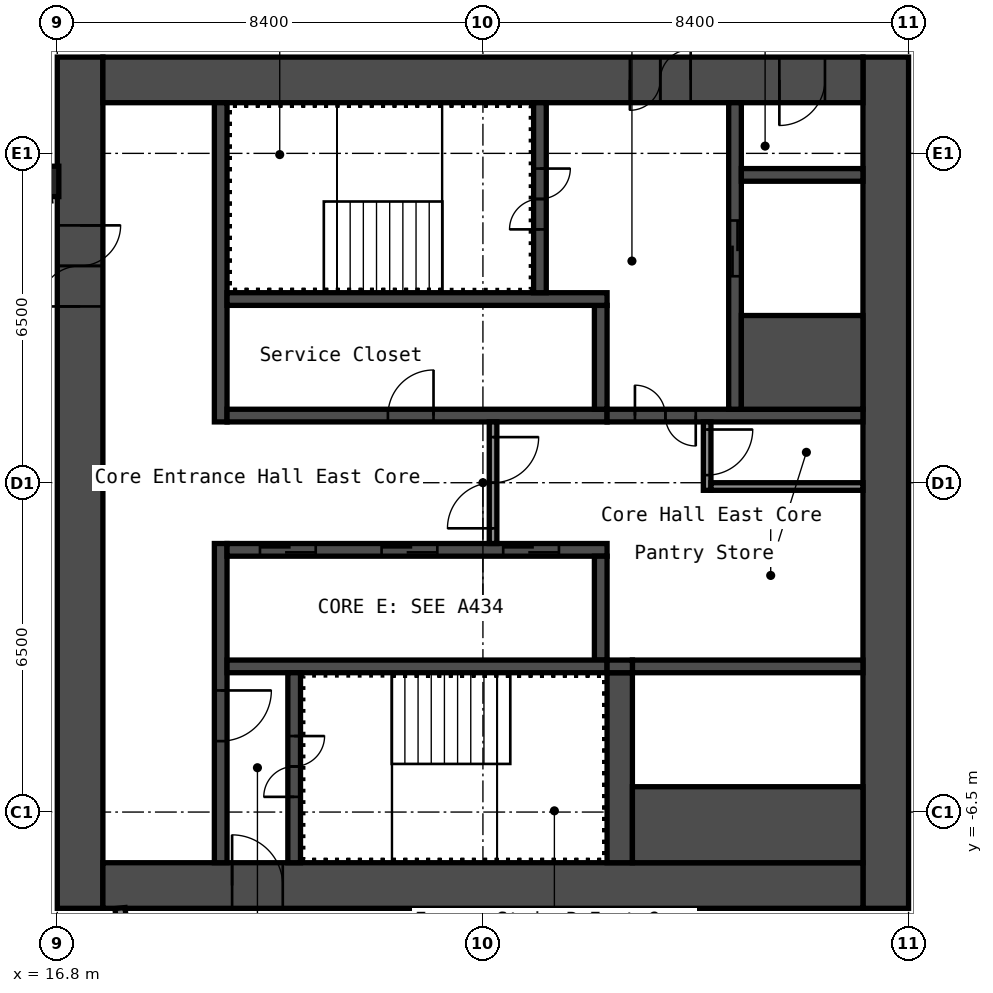
"""IFC4 building model, lengths in metres.
Left out: names, types, materials, properties, quantities, classifications, styles, units other than length and angle.
Written with IfcOpenShell. Run it as: python <this file> out.ifc"""

import sys

from ifc_helpers import new_model, si_unit, direction, frame, frame_2d, origin, origin_2d, place, context, subcontext, project, spatial, rectangle, hollow_rectangle, extrude, element, fill, save


model = new_model("IFC4")
c1 = context("Model", 3, precision=1e-05, world=origin(), true_north=direction((0.0, 1.0)))
c2 = subcontext(c1, "Body", "Model", "MODEL_VIEW")
j1 = project(units=[si_unit("LENGTHUNIT", "METRE"), si_unit("PLANEANGLEUNIT", "RADIAN")], contexts=[c1])
p1 = place(None, origin())
s1 = spatial("IfcSite", under=j1, at=p1, CompositionType="ELEMENT")
p2 = place(p1, origin())
s2 = spatial("IfcBuilding", under=s1, at=p2, CompositionType="ELEMENT")
p3 = place(p2, frame((0.0, 0.0, 232.6)))
s3 = spatial("IfcBuildingStorey", under=s2, at=p3, CompositionType="ELEMENT", Elevation=232.6)
p4 = place(p3, frame((16.53, 5.947, 0.0), z_axis=(0.0, 0.0, 1.0), x_axis=(1.0, 0.0, 0.0)))
e1 = element("IfcColumn", 1, at=p4, inside=s3, PredefinedType="COLUMN", context=c2, shape_type="SweptSolid", body=[
    extrude(hollow_rectangle(XDim=0.6, YDim=0.6, WallThickness=0.025, InnerFilletRadius=0.038, OuterFilletRadius=0.062, at=origin_2d()), origin(), (0.0, 0.0, 1.0), 5.95),
])
p5 = place(p3, frame((17.25, -8.4, 0.0), z_axis=(0.0, 0.0, 1.0), x_axis=(0.0, 1.0, 0.0)))
e2 = element("IfcWall", 2, at=p5, inside=s3, PredefinedType="SHEAR", context=c2, shape_type="SweptSolid", body=[
    extrude(rectangle(XDim=16.8, YDim=0.9, at=frame_2d((8.4, 0.0))), origin(), (0.0, 0.0, 1.0), 5.95),
])
p6 = place(p5, frame((11.879, 0.0, 0.0)))
e3 = element("IfcOpeningElement", 3, at=p6, cuts=e2, PredefinedType="OPENING", context=c2, shape_type="SweptSolid", body=[
    extrude(rectangle(XDim=1.6, YDim=2.1, at=frame_2d((0.8, 1.05))), frame((0.0, 0.46, 0.0), z_axis=(0.0, -1.0, 0.0), x_axis=(1.0, 0.0, 0.0)), (0.0, 0.0, 1.0), 0.92),
])
p7 = place(p3, frame((33.15, -8.4, 0.0), z_axis=(0.0, 0.0, 1.0), x_axis=(0.0, 1.0, 0.0)))
e4 = element("IfcWall", 4, at=p7, inside=s3, PredefinedType="SHEAR", context=c2, shape_type="SweptSolid", body=[
    extrude(rectangle(XDim=16.8, YDim=0.9, at=frame_2d((8.4, 0.0))), origin(), (0.0, 0.0, 1.0), 5.95),
])
p8 = place(p3, frame((17.7, 7.95, 0.0), z_axis=(0.0, 0.0, 1.0), x_axis=(1.0, 0.0, 0.0)))
e5 = element("IfcWall", 5, at=p8, inside=s3, PredefinedType="SHEAR", context=c2, shape_type="SweptSolid", body=[
    extrude(rectangle(XDim=15.0, YDim=0.9, at=frame_2d((7.5, 0.0))), origin(), (0.0, 0.0, 1.0), 5.95),
])
p9 = place(p8, frame((10.4, 0.0, 0.0)))
e6 = element("IfcOpeningElement", 6, at=p9, cuts=e5, PredefinedType="OPENING", context=c2, shape_type="SweptSolid", body=[
    extrude(rectangle(XDim=1.2, YDim=2.1, at=frame_2d((0.6, 1.05))), frame((0.0, 0.46, 0.0), z_axis=(0.0, -1.0, 0.0), x_axis=(1.0, 0.0, 0.0)), (0.0, 0.0, 1.0), 0.92),
])
p10 = place(p8, frame((13.35, 0.0, 0.0)))
e7 = element("IfcOpeningElement", 7, at=p10, cuts=e5, PredefinedType="OPENING", context=c2, shape_type="SweptSolid", body=[
    extrude(rectangle(XDim=0.9, YDim=2.1, at=frame_2d((0.45, 1.05))), frame((0.0, 0.46, 0.0), z_axis=(0.0, -1.0, 0.0), x_axis=(1.0, 0.0, 0.0)), (0.0, 0.0, 1.0), 0.92),
])
p11 = place(p3, frame((17.7, -7.95, 0.0), z_axis=(0.0, 0.0, 1.0), x_axis=(1.0, 0.0, 0.0)))
e8 = element("IfcWall", 8, at=p11, inside=s3, PredefinedType="SHEAR", context=c2, shape_type="SweptSolid", body=[
    extrude(rectangle(XDim=15.0, YDim=0.9, at=frame_2d((7.5, 0.0))), origin(), (0.0, 0.0, 1.0), 5.95),
])
p12 = place(p11, frame((2.55, 0.0, 0.0)))
e9 = element("IfcOpeningElement", 9, at=p12, cuts=e8, PredefinedType="OPENING", context=c2, shape_type="SweptSolid", body=[
    extrude(rectangle(XDim=1.0, YDim=2.1, at=frame_2d((0.5, 1.05))), frame((0.0, 0.46, 0.0), z_axis=(0.0, -1.0, 0.0), x_axis=(1.0, 0.0, 0.0)), (0.0, 0.0, 1.0), 0.92),
])
p13 = place(p3, frame((20.025, 1.2, 0.0), z_axis=(0.0, 0.0, 1.0), x_axis=(0.0, 1.0, 0.0)))
e10 = element("IfcWall", 10, at=p13, inside=s3, PredefinedType="SHEAR", context=c2, shape_type="SweptSolid", body=[
    extrude(rectangle(XDim=6.3, YDim=0.25, at=frame_2d((3.15, 0.0))), origin(), (0.0, 0.0, 1.0), 5.95),
])
p14 = place(p3, frame((20.025, -7.5, 0.0), z_axis=(0.0, 0.0, 1.0), x_axis=(0.0, 1.0, 0.0)))
e11 = element("IfcWall", 11, at=p14, inside=s3, PredefinedType="SHEAR", context=c2, shape_type="SweptSolid", body=[
    extrude(rectangle(XDim=6.3, YDim=0.25, at=frame_2d((3.15, 0.0))), origin(), (0.0, 0.0, 1.0), 5.95),
])
p15 = place(p14, frame((2.4, 0.0, 0.0)))
e12 = element("IfcOpeningElement", 12, at=p15, cuts=e11, PredefinedType="OPENING", context=c2, shape_type="SweptSolid", body=[
    extrude(rectangle(XDim=1.0, YDim=2.1, at=frame_2d((0.5, 1.05))), frame((0.0, 0.135, 0.0), z_axis=(0.0, -1.0, 0.0), x_axis=(1.0, 0.0, 0.0)), (0.0, 0.0, 1.0), 0.27),
])
p16 = place(p3, frame((20.15, 1.325, 0.0), z_axis=(0.0, 0.0, 1.0), x_axis=(1.0, 0.0, 0.0)))
e13 = element("IfcWall", 13, at=p16, inside=s3, PredefinedType="SHEAR", context=c2, shape_type="SweptSolid", body=[
    extrude(rectangle(XDim=7.5, YDim=0.25, at=frame_2d((3.75, 0.0))), origin(), (0.0, 0.0, 1.0), 5.95),
])
p17 = place(p16, frame((3.175, 0.0, 0.0)))
e14 = element("IfcOpeningElement", 14, at=p17, cuts=e13, PredefinedType="OPENING", context=c2, shape_type="SweptSolid", body=[
    extrude(rectangle(XDim=0.9, YDim=2.1, at=frame_2d((0.45, 1.05))), frame((0.0, 0.135, 0.0), z_axis=(0.0, -1.0, 0.0), x_axis=(1.0, 0.0, 0.0)), (0.0, 0.0, 1.0), 0.27),
])
p18 = place(p3, frame((27.525, 1.45, 0.0), z_axis=(0.0, 0.0, 1.0), x_axis=(0.0, 1.0, 0.0)))
e15 = element("IfcWall", 15, at=p18, inside=s3, PredefinedType="SHEAR", context=c2, shape_type="SweptSolid", body=[
    extrude(rectangle(XDim=2.05, YDim=0.25, at=frame_2d((1.025, 0.0))), origin(), (0.0, 0.0, 1.0), 5.95),
])
p19 = place(p3, frame((20.15, 3.625, 0.0), z_axis=(0.0, 0.0, 1.0), x_axis=(1.0, 0.0, 0.0)))
e16 = element("IfcWall", 16, at=p19, inside=s3, PredefinedType="SHEAR", context=c2, shape_type="SweptSolid", body=[
    extrude(rectangle(XDim=7.5, YDim=0.25, at=frame_2d((3.75, 0.0))), origin(), (0.0, 0.0, 1.0), 5.95),
])
p20 = place(p3, frame((26.325, 3.75, 0.0), z_axis=(0.0, 0.0, 1.0), x_axis=(0.0, 1.0, 0.0)))
e17 = element("IfcWall", 17, at=p20, inside=s3, PredefinedType="SHEAR", context=c2, shape_type="SweptSolid", body=[
    extrude(rectangle(XDim=3.75, YDim=0.25, at=frame_2d((1.875, 0.0))), origin(), (0.0, 0.0, 1.0), 5.95),
])
p21 = place(p20, frame((1.25, 0.0, 0.0)))
e18 = element("IfcOpeningElement", 18, at=p21, cuts=e17, PredefinedType="OPENING", context=c2, shape_type="SweptSolid", body=[
    extrude(rectangle(XDim=1.2, YDim=2.1, at=frame_2d((0.6, 1.05))), frame((0.0, 0.135, 0.0), z_axis=(0.0, -1.0, 0.0), x_axis=(1.0, 0.0, 0.0)), (0.0, 0.0, 1.0), 0.27),
])
p22 = place(p3, frame((27.65, 1.325, 0.0), z_axis=(0.0, 0.0, 1.0), x_axis=(1.0, 0.0, 0.0)))
e19 = element("IfcWall", 19, at=p22, inside=s3, PredefinedType="SHEAR", context=c2, shape_type="SweptSolid", body=[
    extrude(rectangle(XDim=5.05, YDim=0.25, at=frame_2d((2.525, 0.0))), origin(), (0.0, 0.0, 1.0), 5.95),
])
p23 = place(p22, frame((0.55, 0.0, 0.0)))
e20 = element("IfcOpeningElement", 20, at=p23, cuts=e19, PredefinedType="OPENING", context=c2, shape_type="SweptSolid", body=[
    extrude(rectangle(XDim=1.2, YDim=2.1, at=frame_2d((0.6, 1.05))), frame((0.0, 0.135, 0.0), z_axis=(0.0, -1.0, 0.0), x_axis=(1.0, 0.0, 0.0)), (0.0, 0.0, 1.0), 0.27),
])
p24 = place(p3, frame((30.175, 1.45, 0.0), z_axis=(0.0, 0.0, 1.0), x_axis=(0.0, 1.0, 0.0)))
e21 = element("IfcWall", 21, at=p24, inside=s3, PredefinedType="SHEAR", context=c2, shape_type="SweptSolid", body=[
    extrude(rectangle(XDim=6.05, YDim=0.25, at=frame_2d((3.025, 0.0))), origin(), (0.0, 0.0, 1.0), 5.95),
])
p25 = place(p24, frame((2.625, 0.0, 0.0)))
e22 = element("IfcOpeningElement", 22, at=p25, cuts=e21, PredefinedType="OPENING", context=c2, shape_type="SweptSolid", body=[
    extrude(rectangle(XDim=1.1, YDim=2.1, at=frame_2d((0.55, 1.05))), frame((0.0, 0.135, 0.0), z_axis=(0.0, -1.0, 0.0), x_axis=(1.0, 0.0, 0.0)), (0.0, 0.0, 1.0), 0.27),
])
p26 = place(p3, frame((30.3, 2.375, 0.0), z_axis=(0.0, 0.0, 1.0), x_axis=(1.0, 0.0, 0.0)))
e23 = element("IfcWall", 23, at=p26, inside=s3, PredefinedType="SHEAR", context=c2, shape_type="SweptSolid", body=[
    extrude(rectangle(XDim=2.4, YDim=1.85, at=frame_2d((1.2, 0.0))), origin(), (0.0, 0.0, 1.0), 5.95),
])
p27 = place(p3, frame((30.3, 6.075, 0.0), z_axis=(0.0, 0.0, 1.0), x_axis=(1.0, 0.0, 0.0)))
e24 = element("IfcWall", 24, at=p27, inside=s3, PredefinedType="SHEAR", context=c2, shape_type="SweptSolid", body=[
    extrude(rectangle(XDim=2.4, YDim=0.25, at=frame_2d((1.2, 0.0))), origin(), (0.0, 0.0, 1.0), 5.95),
])
p28 = place(p3, frame((20.15, -1.325, 0.0), z_axis=(0.0, 0.0, 1.0), x_axis=(1.0, 0.0, 0.0)))
e25 = element("IfcWall", 25, at=p28, inside=s3, PredefinedType="SHEAR", context=c2, shape_type="SweptSolid", body=[
    extrude(rectangle(XDim=7.5, YDim=0.25, at=frame_2d((3.75, 0.0))), origin(), (0.0, 0.0, 1.0), 5.95),
])
p29 = place(p28, frame((0.65, 0.0, 0.0)))
e26 = element("IfcOpeningElement", 26, at=p29, cuts=e25, PredefinedType="OPENING", context=c2, shape_type="SweptSolid", body=[
    extrude(rectangle(XDim=1.1, YDim=2.1, at=frame_2d((0.55, 1.05))), frame((0.0, 0.135, 0.0), z_axis=(0.0, -1.0, 0.0), x_axis=(1.0, 0.0, 0.0)), (0.0, 0.0, 1.0), 0.27),
])
p30 = place(p28, frame((3.05, 0.0, 0.0)))
e27 = element("IfcOpeningElement", 27, at=p30, cuts=e25, PredefinedType="OPENING", context=c2, shape_type="SweptSolid", body=[
    extrude(rectangle(XDim=1.1, YDim=2.1, at=frame_2d((0.55, 1.05))), frame((0.0, 0.135, 0.0), z_axis=(0.0, -1.0, 0.0), x_axis=(1.0, 0.0, 0.0)), (0.0, 0.0, 1.0), 0.27),
])
p31 = place(p28, frame((5.45, 0.0, 0.0)))
e28 = element("IfcOpeningElement", 28, at=p31, cuts=e25, PredefinedType="OPENING", context=c2, shape_type="SweptSolid", body=[
    extrude(rectangle(XDim=1.1, YDim=2.1, at=frame_2d((0.55, 1.05))), frame((0.0, 0.135, 0.0), z_axis=(0.0, -1.0, 0.0), x_axis=(1.0, 0.0, 0.0)), (0.0, 0.0, 1.0), 0.27),
])
p32 = place(p3, frame((27.525, -3.5, 0.0), z_axis=(0.0, 0.0, 1.0), x_axis=(0.0, 1.0, 0.0)))
e29 = element("IfcWall", 29, at=p32, inside=s3, PredefinedType="SHEAR", context=c2, shape_type="SweptSolid", body=[
    extrude(rectangle(XDim=2.05, YDim=0.25, at=frame_2d((1.025, 0.0))), origin(), (0.0, 0.0, 1.0), 5.95),
])
p33 = place(p3, frame((20.15, -3.625, 0.0), z_axis=(0.0, 0.0, 1.0), x_axis=(1.0, 0.0, 0.0)))
e30 = element("IfcWall", 30, at=p33, inside=s3, PredefinedType="SHEAR", context=c2, shape_type="SweptSolid", body=[
    extrude(rectangle(XDim=7.5, YDim=0.25, at=frame_2d((3.75, 0.0))), origin(), (0.0, 0.0, 1.0), 5.95),
])
p34 = place(p3, frame((21.475, -7.5, 0.0), z_axis=(0.0, 0.0, 1.0), x_axis=(0.0, 1.0, 0.0)))
e31 = element("IfcWall", 31, at=p34, inside=s3, PredefinedType="SHEAR", context=c2, shape_type="SweptSolid", body=[
    extrude(rectangle(XDim=3.75, YDim=0.25, at=frame_2d((1.875, 0.0))), origin(), (0.0, 0.0, 1.0), 5.95),
])
p35 = place(p34, frame((1.3, 0.0, 0.0)))
e32 = element("IfcOpeningElement", 32, at=p35, cuts=e31, PredefinedType="OPENING", context=c2, shape_type="SweptSolid", body=[
    extrude(rectangle(XDim=1.2, YDim=2.1, at=frame_2d((0.6, 1.05))), frame((0.0, 0.135, 0.0), z_axis=(0.0, -1.0, 0.0), x_axis=(1.0, 0.0, 0.0)), (0.0, 0.0, 1.0), 0.27),
])
p36 = place(p3, frame((27.9, -7.5, 0.0), z_axis=(0.0, 0.0, 1.0), x_axis=(0.0, 1.0, 0.0)))
e33 = element("IfcWall", 33, at=p36, inside=s3, PredefinedType="SHEAR", context=c2, shape_type="SweptSolid", body=[
    extrude(rectangle(XDim=3.75, YDim=0.5, at=frame_2d((1.875, 0.0))), origin(), (0.0, 0.0, 1.0), 5.95),
])
p37 = place(p3, frame((28.15, -3.625, 0.0), z_axis=(0.0, 0.0, 1.0), x_axis=(1.0, 0.0, 0.0)))
e34 = element("IfcWall", 34, at=p37, inside=s3, PredefinedType="SHEAR", context=c2, shape_type="SweptSolid", body=[
    extrude(rectangle(XDim=4.55, YDim=0.25, at=frame_2d((2.275, 0.0))), origin(), (0.0, 0.0, 1.0), 5.95),
])
p38 = place(p3, frame((28.15, -6.75, 0.0), z_axis=(0.0, 0.0, 1.0), x_axis=(1.0, 0.0, 0.0)))
e35 = element("IfcWall", 35, at=p38, inside=s3, PredefinedType="SHEAR", context=c2, shape_type="SweptSolid", body=[
    extrude(rectangle(XDim=4.55, YDim=1.5, at=frame_2d((2.275, 0.0))), origin(), (0.0, 0.0, 1.0), 5.95),
])
p39 = place(p3, frame((27.65, -3.625, 0.0), z_axis=(0.0, 0.0, 1.0), x_axis=(1.0, 0.0, 0.0)))
e36 = element("IfcWall", 36, at=p39, inside=s3, PredefinedType="SHEAR", context=c2, shape_type="SweptSolid", body=[
    extrude(rectangle(XDim=0.5, YDim=0.25, at=frame_2d((0.25, 0.0))), origin(), (0.0, 0.0, 1.0), 5.95),
])
p40 = place(p3, frame((25.4, -1.2, 0.0), z_axis=(0.0, 0.0, 1.0), x_axis=(0.0, 1.0, 0.0)))
e37 = element("IfcWall", 37, at=p40, inside=s3, PredefinedType="PARTITIONING", context=c2, shape_type="SweptSolid", body=[
    extrude(rectangle(XDim=2.4, YDim=0.15, at=frame_2d((1.2, 0.0))), origin(), (0.0, 0.0, 1.0), 5.95),
])
p41 = place(p40, frame((0.3, 0.0, 0.0)))
e38 = element("IfcOpeningElement", 38, at=p41, cuts=e37, PredefinedType="OPENING", context=c2, shape_type="SweptSolid", body=[
    extrude(rectangle(XDim=1.8, YDim=2.1, at=frame_2d((0.9, 1.05))), frame((0.0, 0.085, 0.0), z_axis=(0.0, -1.0, 0.0), x_axis=(1.0, 0.0, 0.0)), (0.0, 0.0, 1.0), 0.17),
])
p42 = place(p3, frame((29.625, -0.15, 0.0), z_axis=(0.0, 0.0, 1.0), x_axis=(0.0, 1.0, 0.0)))
e39 = element("IfcWall", 39, at=p42, inside=s3, PredefinedType="PARTITIONING", context=c2, shape_type="SweptSolid", body=[
    extrude(rectangle(XDim=1.35, YDim=0.15, at=frame_2d((0.675, 0.0))), origin(), (0.0, 0.0, 1.0), 5.95),
])
p43 = place(p42, frame((0.3, 0.0, 0.0)))
e40 = element("IfcOpeningElement", 40, at=p43, cuts=e39, PredefinedType="OPENING", context=c2, shape_type="SweptSolid", body=[
    extrude(rectangle(XDim=0.9, YDim=2.1, at=frame_2d((0.45, 1.05))), frame((0.0, 0.085, 0.0), z_axis=(0.0, -1.0, 0.0), x_axis=(1.0, 0.0, 0.0)), (0.0, 0.0, 1.0), 0.17),
])
p44 = place(p3, frame((29.7, -0.075, 0.0), z_axis=(0.0, 0.0, 1.0), x_axis=(1.0, 0.0, 0.0)))
e41 = element("IfcWall", 41, at=p44, inside=s3, PredefinedType="PARTITIONING", context=c2, shape_type="SweptSolid", body=[
    extrude(rectangle(XDim=3.0, YDim=0.15, at=frame_2d((1.5, 0.0))), origin(), (0.0, 0.0, 1.0), 5.95),
])
p45 = place(p3, frame((18.516, -12.949, 0.0), z_axis=(0.0, 0.0, 1.0), x_axis=(-0.104548796268, 0.994519758074, 0.0)))
e42 = element("IfcWall", 42, at=p45, inside=s3, PredefinedType="PARTITIONING", context=c2, shape_type="SweptSolid", body=[
    extrude(rectangle(XDim=4.579, YDim=0.2, at=frame_2d((2.29, 0.0))), origin(), (0.0, 0.0, 1.0), 5.95),
])
p46 = place(p6, origin())
e43 = element("IfcDoor", 43, at=p46, inside=s3, OperationType="DOUBLE_DOOR_SINGLE_SWING", PredefinedType="DOOR", context=c2, shape_type="SweptSolid", body=[
    extrude(rectangle(XDim=1.6, YDim=2.1, at=frame_2d((0.8, 1.05))), frame((0.0, 0.025, 0.0), z_axis=(0.0, -1.0, 0.0), x_axis=(1.0, 0.0, 0.0)), (0.0, 0.0, 1.0), 0.05),
])
fill(e3, e43)
p47 = place(p9, origin())
e44 = element("IfcDoor", 44, at=p47, inside=s3, OperationType="DOUBLE_DOOR_SINGLE_SWING", PredefinedType="DOOR", context=c2, shape_type="SweptSolid", body=[
    extrude(rectangle(XDim=1.2, YDim=2.1, at=frame_2d((0.6, 1.05))), frame((0.0, 0.025, 0.0), z_axis=(0.0, -1.0, 0.0), x_axis=(1.0, 0.0, 0.0)), (0.0, 0.0, 1.0), 0.05),
])
fill(e6, e44)
p48 = place(p10, origin())
e45 = element("IfcDoor", 45, at=p48, inside=s3, OperationType="SINGLE_SWING_LEFT", PredefinedType="DOOR", context=c2, shape_type="SweptSolid", body=[
    extrude(rectangle(XDim=0.9, YDim=2.1, at=frame_2d((0.45, 1.05))), frame((0.0, 0.025, 0.0), z_axis=(0.0, -1.0, 0.0), x_axis=(1.0, 0.0, 0.0)), (0.0, 0.0, 1.0), 0.05),
])
fill(e7, e45)
p49 = place(p12, origin())
e46 = element("IfcDoor", 46, at=p49, inside=s3, OperationType="SINGLE_SWING_RIGHT", PredefinedType="DOOR", context=c2, shape_type="SweptSolid", body=[
    extrude(rectangle(XDim=1.0, YDim=2.1, at=frame_2d((0.5, 1.05))), frame((0.0, 0.025, 0.0), z_axis=(0.0, -1.0, 0.0), x_axis=(1.0, 0.0, 0.0)), (0.0, 0.0, 1.0), 0.05),
])
fill(e9, e46)
p50 = place(p21, origin())
e47 = element("IfcDoor", 47, at=p50, inside=s3, OperationType="DOUBLE_DOOR_SINGLE_SWING", PredefinedType="DOOR", context=c2, shape_type="SweptSolid", body=[
    extrude(rectangle(XDim=1.2, YDim=2.1, at=frame_2d((0.6, 1.05))), frame((0.0, 0.025, 0.0), z_axis=(0.0, -1.0, 0.0), x_axis=(1.0, 0.0, 0.0)), (0.0, 0.0, 1.0), 0.05),
])
fill(e18, e47)
p51 = place(p35, origin())
e48 = element("IfcDoor", 48, at=p51, inside=s3, OperationType="DOUBLE_DOOR_SINGLE_SWING", PredefinedType="DOOR", context=c2, shape_type="SweptSolid", body=[
    extrude(rectangle(XDim=1.2, YDim=2.1, at=frame_2d((0.6, 1.05))), frame((0.0, 0.025, 0.0), z_axis=(0.0, -1.0, 0.0), x_axis=(1.0, 0.0, 0.0)), (0.0, 0.0, 1.0), 0.05),
])
fill(e32, e48)
p52 = place(p15, origin())
e49 = element("IfcDoor", 49, at=p52, inside=s3, OperationType="SINGLE_SWING_RIGHT", PredefinedType="DOOR", context=c2, shape_type="SweptSolid", body=[
    extrude(rectangle(XDim=1.0, YDim=2.1, at=frame_2d((0.5, 1.05))), frame((0.0, 0.025, 0.0), z_axis=(0.0, -1.0, 0.0), x_axis=(1.0, 0.0, 0.0)), (0.0, 0.0, 1.0), 0.05),
])
fill(e12, e49)
p53 = place(p23, origin())
e50 = element("IfcDoor", 50, at=p53, inside=s3, OperationType="DOUBLE_DOOR_SINGLE_SWING", PredefinedType="DOOR", context=c2, shape_type="SweptSolid", body=[
    extrude(rectangle(XDim=1.2, YDim=2.1, at=frame_2d((0.6, 1.05))), frame((0.0, 0.025, 0.0), z_axis=(0.0, -1.0, 0.0), x_axis=(1.0, 0.0, 0.0)), (0.0, 0.0, 1.0), 0.05),
])
fill(e20, e50)
p54 = place(p41, origin())
e51 = element("IfcDoor", 51, at=p54, inside=s3, OperationType="DOUBLE_DOOR_SINGLE_SWING", PredefinedType="DOOR", context=c2, shape_type="SweptSolid", body=[
    extrude(rectangle(XDim=1.8, YDim=2.1, at=frame_2d((0.9, 1.05))), frame((0.0, 0.025, 0.0), z_axis=(0.0, -1.0, 0.0), x_axis=(1.0, 0.0, 0.0)), (0.0, 0.0, 1.0), 0.05),
])
fill(e38, e51)
p55 = place(p43, origin())
e52 = element("IfcDoor", 52, at=p55, inside=s3, OperationType="SINGLE_SWING_RIGHT", PredefinedType="DOOR", context=c2, shape_type="SweptSolid", body=[
    extrude(rectangle(XDim=0.9, YDim=2.1, at=frame_2d((0.45, 1.05))), frame((0.0, 0.025, 0.0), z_axis=(0.0, -1.0, 0.0), x_axis=(1.0, 0.0, 0.0)), (0.0, 0.0, 1.0), 0.05),
])
fill(e40, e52)
p56 = place(p17, origin())
e53 = element("IfcDoor", 53, at=p56, inside=s3, OperationType="SINGLE_SWING_LEFT", PredefinedType="DOOR", context=c2, shape_type="SweptSolid", body=[
    extrude(rectangle(XDim=0.9, YDim=2.1, at=frame_2d((0.45, 1.05))), frame((0.0, 0.025, 0.0), z_axis=(0.0, -1.0, 0.0), x_axis=(1.0, 0.0, 0.0)), (0.0, 0.0, 1.0), 0.05),
])
fill(e14, e53)
p57 = place(p29, origin())
e54 = element("IfcDoor", 54, at=p57, inside=s3, OperationType="DOUBLE_DOOR_SLIDING", PredefinedType="DOOR", context=c2, shape_type="SweptSolid", body=[
    extrude(rectangle(XDim=1.1, YDim=2.1, at=frame_2d((0.55, 1.05))), frame((0.0, 0.025, 0.0), z_axis=(0.0, -1.0, 0.0), x_axis=(1.0, 0.0, 0.0)), (0.0, 0.0, 1.0), 0.05),
])
fill(e26, e54)
p58 = place(p30, origin())
e55 = element("IfcDoor", 55, at=p58, inside=s3, OperationType="DOUBLE_DOOR_SLIDING", PredefinedType="DOOR", context=c2, shape_type="SweptSolid", body=[
    extrude(rectangle(XDim=1.1, YDim=2.1, at=frame_2d((0.55, 1.05))), frame((0.0, 0.025, 0.0), z_axis=(0.0, -1.0, 0.0), x_axis=(1.0, 0.0, 0.0)), (0.0, 0.0, 1.0), 0.05),
])
fill(e27, e55)
p59 = place(p31, origin())
e56 = element("IfcDoor", 56, at=p59, inside=s3, OperationType="DOUBLE_DOOR_SLIDING", PredefinedType="DOOR", context=c2, shape_type="SweptSolid", body=[
    extrude(rectangle(XDim=1.1, YDim=2.1, at=frame_2d((0.55, 1.05))), frame((0.0, 0.025, 0.0), z_axis=(0.0, -1.0, 0.0), x_axis=(1.0, 0.0, 0.0)), (0.0, 0.0, 1.0), 0.05),
])
fill(e28, e56)
p60 = place(p25, origin())
e57 = element("IfcDoor", 57, at=p60, inside=s3, OperationType="DOUBLE_DOOR_SLIDING", PredefinedType="DOOR", context=c2, shape_type="SweptSolid", body=[
    extrude(rectangle(XDim=1.1, YDim=2.1, at=frame_2d((0.55, 1.05))), frame((0.0, 0.025, 0.0), z_axis=(0.0, -1.0, 0.0), x_axis=(1.0, 0.0, 0.0)), (0.0, 0.0, 1.0), 0.05),
])
fill(e22, e57)
save(model, sys.argv[1])
